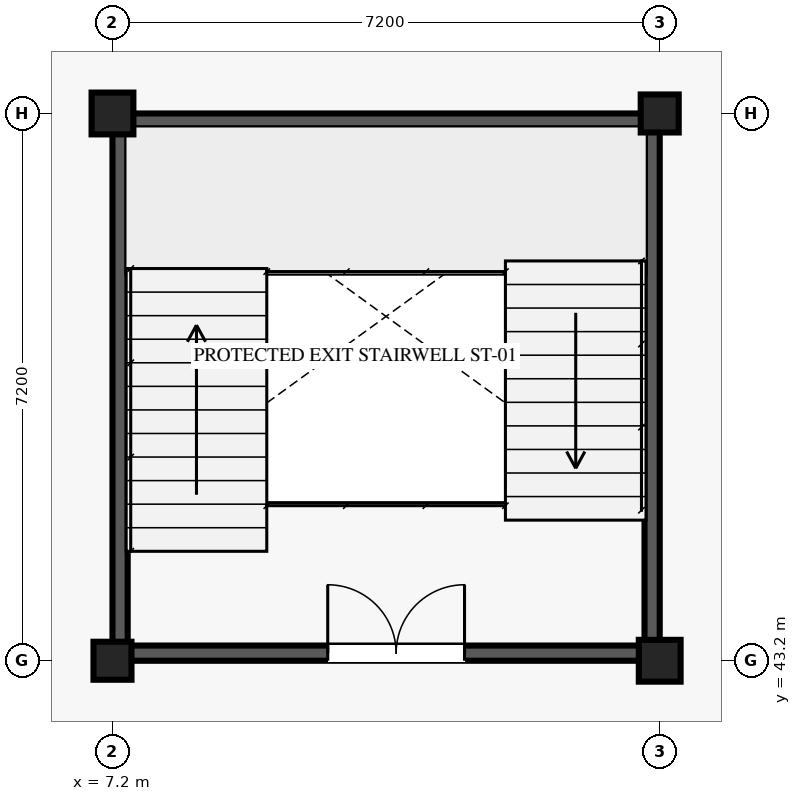
"""IFC4 building model, lengths in metres.
Left out: names, types, materials, properties, quantities, classifications, styles, units other than length and angle.
Written with IfcOpenShell. Run it as: python <this file> out.ifc"""

import sys

from ifc_helpers import new_model, si_unit, direction, frame, frame_2d, origin, origin_2d, place, context, subcontext, project, spatial, rectangle, extrude, element, fill, save


model = new_model("IFC4")
c1 = context("Model", 3, precision=1e-05, world=origin(), true_north=direction((0.0, 1.0)))
c2 = subcontext(c1, "Body", "Model", "MODEL_VIEW")
j1 = project(units=[si_unit("LENGTHUNIT", "METRE"), si_unit("PLANEANGLEUNIT", "RADIAN")], contexts=[c1])
p1 = place(None, origin())
s1 = spatial("IfcSite", under=j1, at=p1, CompositionType="ELEMENT")
p2 = place(p1, origin())
s2 = spatial("IfcBuilding", under=s1, at=p2, CompositionType="ELEMENT")
p3 = place(p2, frame((0.0, 0.0, 29.7)))
s3 = spatial("IfcBuildingStorey", under=s2, at=p3, CompositionType="ELEMENT", Elevation=29.7)
p4 = place(p3, frame((7.2, 43.2, 0.0), z_axis=(0.0, 0.0, 1.0), x_axis=(1.0, 0.0, 0.0)))
e1 = element("IfcColumn", 1, at=p4, inside=s3, PredefinedType="COLUMN", context=c2, shape_type="SweptSolid", body=[
    extrude(rectangle(XDim=0.5, YDim=0.5, at=origin_2d()), origin(), (0.0, 0.0, 1.0), 4.05),
])
for number, where, z_axis, x_axis in (
    (2, (7.2, 50.4, 0.0), (0.0, 0.0, 1.0), (1.0, 0.0, 0.0)),
    (3, (14.4, 43.2, 0.0), (0.0, 0.0, 1.0), (1.0, 0.0, 0.0)),
):
    element("IfcColumn", number, at=place(p3, frame(where, z_axis=z_axis, x_axis=x_axis)), inside=s3, PredefinedType="COLUMN", context=c2, shape_type="SweptSolid", body=[
        extrude(rectangle(XDim=0.55, YDim=0.55, at=origin_2d()), origin(), (0.0, 0.0, 1.0), 4.05),
    ])
p5 = place(p3, frame((14.4, 50.4, 0.0), z_axis=(0.0, 0.0, 1.0), x_axis=(1.0, 0.0, 0.0)))
e4 = element("IfcColumn", 4, at=p5, inside=s3, PredefinedType="COLUMN", context=c2, shape_type="SweptSolid", body=[
    extrude(rectangle(XDim=0.5, YDim=0.5, at=origin_2d()), origin(), (0.0, 0.0, 1.0), 4.05),
])
p6 = place(p3, frame((7.4, 43.3, 0.0), z_axis=(0.0, 0.0, 1.0), x_axis=(1.0, 0.0, 0.0)))
e5 = element("IfcWall", 5, at=p6, inside=s3, PredefinedType="SHEAR", context=c2, shape_type="SweptSolid", body=[
    extrude(rectangle(XDim=6.8, YDim=0.2, at=frame_2d((3.4, 0.0))), origin(), (0.0, 0.0, 1.0), 3.83),
])
p7 = place(p6, frame((2.632, 0.0, 0.0)))
e6 = element("IfcOpeningElement", 6, at=p7, cuts=e5, PredefinedType="OPENING", context=c2, shape_type="SweptSolid", body=[
    extrude(rectangle(XDim=1.8, YDim=2.2, at=frame_2d((0.9, 1.1))), frame((0.0, 0.11, 0.0), z_axis=(0.0, -1.0, 0.0), x_axis=(1.0, 0.0, 0.0)), (0.0, 0.0, 1.0), 0.22),
])
for number, where, z_axis, x_axis in (
    (7, (7.4, 50.3, 0.0), (0.0, 0.0, 1.0), (1.0, 0.0, 0.0)),
    (8, (7.3, 43.4, 0.0), (0.0, 0.0, 1.0), (0.0, 1.0, 0.0)),
    (9, (14.3, 43.4, 0.0), (0.0, 0.0, 1.0), (0.0, 1.0, 0.0)),
):
    element("IfcWall", number, at=place(p3, frame(where, z_axis=z_axis, x_axis=x_axis)), inside=s3, PredefinedType="SHEAR", context=c2, shape_type="SweptSolid", body=[
        extrude(rectangle(XDim=6.8, YDim=0.2, at=frame_2d((3.4, 0.0))), origin(), (0.0, 0.0, 1.0), 3.83),
    ])
p8 = place(p7, origin())
e10 = element("IfcDoor", 10, at=p8, inside=s3, OperationType="DOUBLE_DOOR_SINGLE_SWING", PredefinedType="DOOR", context=c2, shape_type="SweptSolid", body=[
    extrude(rectangle(XDim=1.8, YDim=2.2, at=frame_2d((0.9, 1.1))), frame((0.0, 0.025, 0.0), z_axis=(0.0, -1.0, 0.0), x_axis=(1.0, 0.0, 0.0)), (0.0, 0.0, 1.0), 0.05),
])
fill(e6, e10)
save(model, sys.argv[1])
